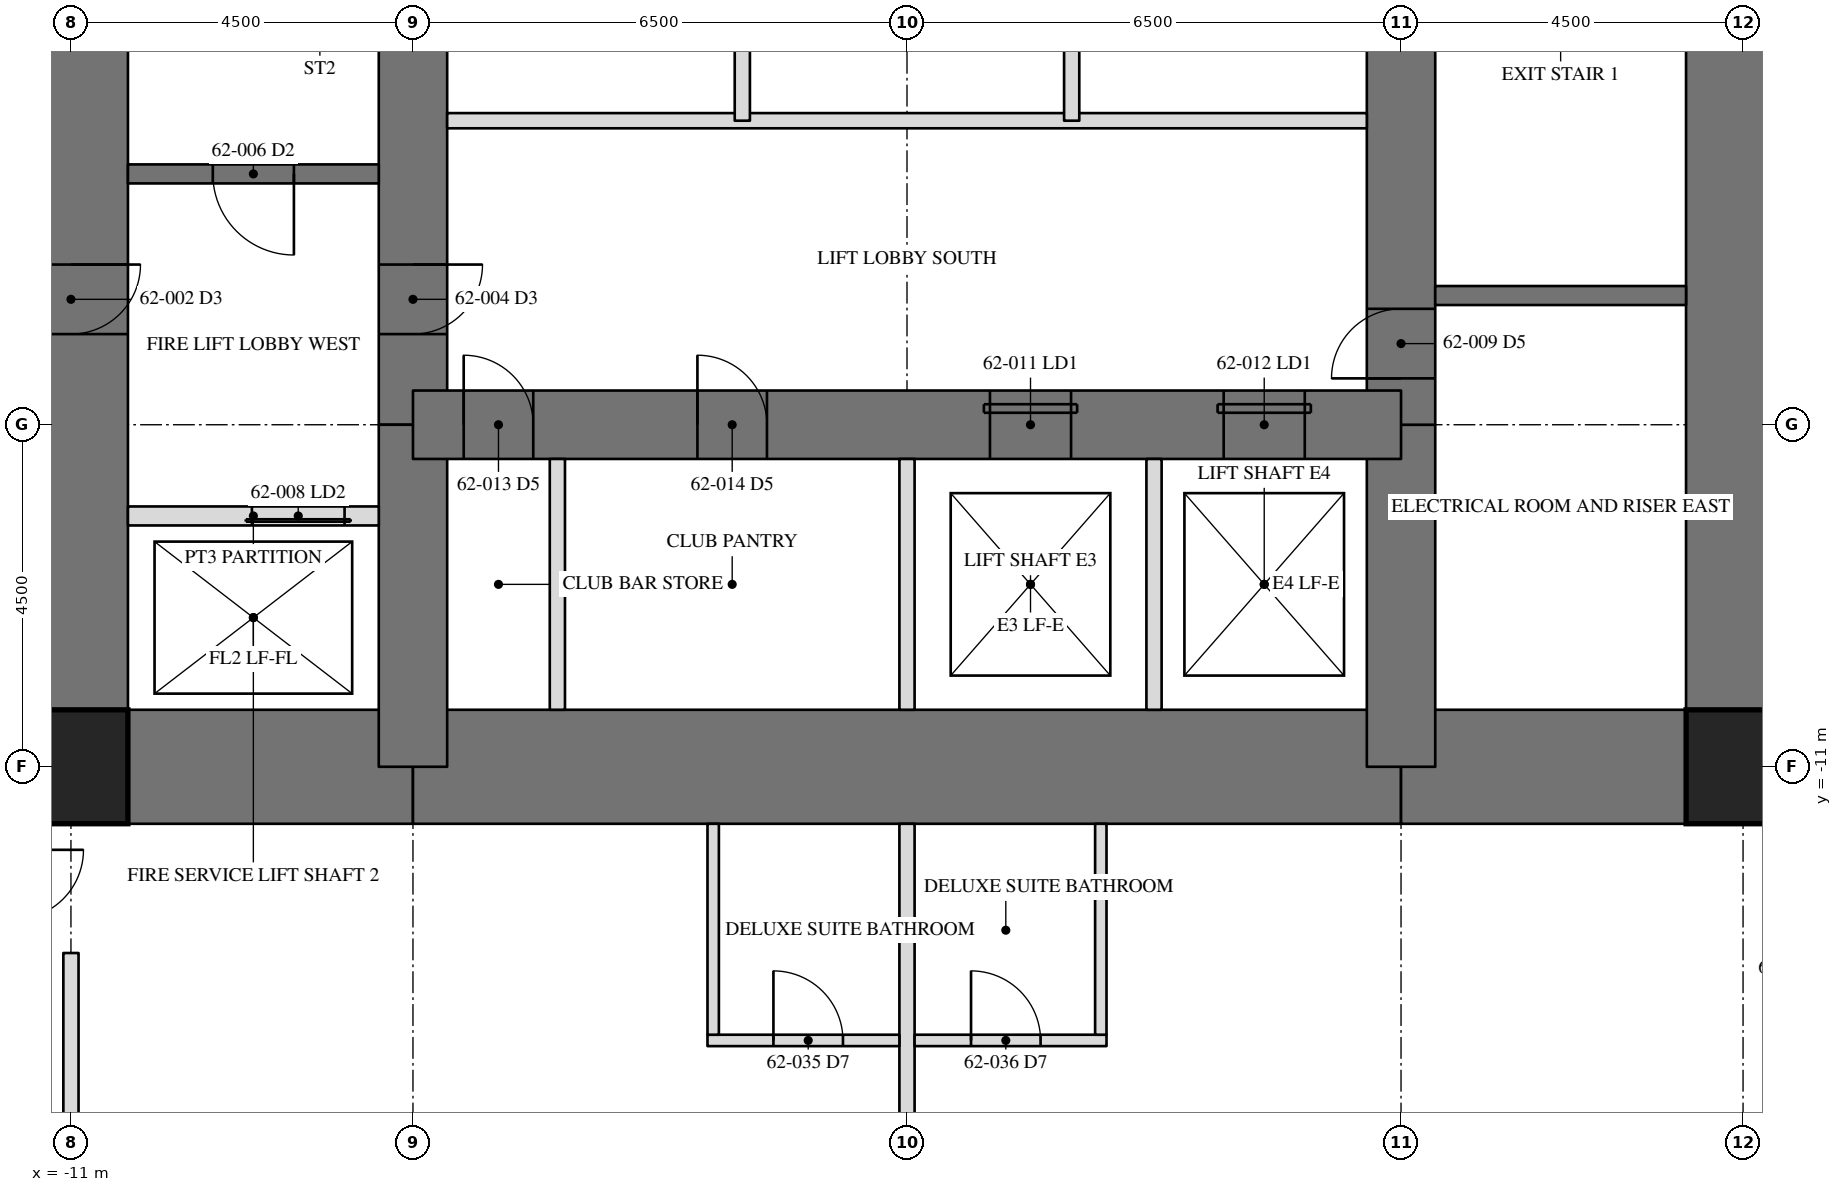
"""IFC4 building model, lengths in metres.
Left out: names, types, materials, properties, quantities, classifications, styles, units other than length and angle.
Written with IfcOpenShell. Run it as: python <this file> out.ifc"""

import sys

from ifc_helpers import new_model, si_unit, direction, frame, frame_2d, origin, origin_2d, place, context, subcontext, project, spatial, rectangle, hollow_rectangle, extrude, element, fill, save


model = new_model("IFC4")
c1 = context("Model", 3, precision=1e-05, world=origin(), true_north=direction((0.0, 1.0)))
c2 = subcontext(c1, "Body", "Model", "MODEL_VIEW")
j1 = project(units=[si_unit("LENGTHUNIT", "METRE"), si_unit("PLANEANGLEUNIT", "RADIAN")], contexts=[c1])
p1 = place(None, origin())
s1 = spatial("IfcSite", under=j1, at=p1, CompositionType="ELEMENT")
p2 = place(p1, origin())
s2 = spatial("IfcBuilding", under=s1, at=p2, CompositionType="ELEMENT")
p3 = place(p2, frame((0.0, 0.0, 253.7)))
s3 = spatial("IfcBuildingStorey", under=s2, at=p3, CompositionType="ELEMENT", Elevation=253.7)
p4 = place(p3, frame((11.0, -11.0, 0.0), z_axis=(0.0, 0.0, 1.0), x_axis=(0.0, 1.0, 0.0)))
e1 = element("IfcWall", 1, at=p4, inside=s3, PredefinedType="SHEAR", context=c2, shape_type="SweptSolid", body=[
    extrude(rectangle(XDim=22.0, YDim=1.5, at=frame_2d((11.0, 0.0))), origin(), (0.0, 0.0, 1.0), 3.5),
])
p5 = place(p4, frame((15.393, 0.0, 0.0)))
e2 = element("IfcOpeningElement", 2, at=p5, cuts=e1, PredefinedType="OPENING", context=c2, shape_type="SweptSolid", body=[
    extrude(rectangle(XDim=0.915, YDim=2.134, at=frame_2d((0.458, 1.067))), frame((0.0, 0.76, 0.0), z_axis=(0.0, -1.0, 0.0), x_axis=(1.0, 0.0, 0.0)), (0.0, 0.0, 1.0), 1.52),
])
p6 = place(p3, frame((-11.0, 11.0, 0.0), z_axis=(0.0, 0.0, 1.0), x_axis=(0.0, -1.0, 0.0)))
e3 = element("IfcWall", 3, at=p6, inside=s3, PredefinedType="SHEAR", context=c2, shape_type="SweptSolid", body=[
    extrude(rectangle(XDim=22.0, YDim=1.5, at=frame_2d((11.0, 0.0))), origin(), (0.0, 0.0, 1.0), 3.5),
])
p7 = place(p6, frame((15.393, 0.0, 0.0)))
e4 = element("IfcOpeningElement", 4, at=p7, cuts=e3, PredefinedType="OPENING", context=c2, shape_type="SweptSolid", body=[
    extrude(rectangle(XDim=0.915, YDim=2.134, at=frame_2d((0.458, 1.067))), frame((0.0, 0.76, 0.0), z_axis=(0.0, -1.0, 0.0), x_axis=(1.0, 0.0, 0.0)), (0.0, 0.0, 1.0), 1.52),
])
p8 = place(p3, frame((-11.0, -11.0, 0.0), z_axis=(0.0, 0.0, 1.0), x_axis=(1.0, 0.0, 0.0)))
e5 = element("IfcWall", 5, at=p8, inside=s3, PredefinedType="SHEAR", context=c2, shape_type="SweptSolid", body=[
    extrude(rectangle(XDim=4.5, YDim=1.5, at=frame_2d((2.25, 0.0))), origin(), (0.0, 0.0, 1.0), 3.5),
])
p9 = place(p3, frame((-6.5, -11.0, 0.0), z_axis=(0.0, 0.0, 1.0), x_axis=(1.0, 0.0, 0.0)))
e6 = element("IfcWall", 6, at=p9, inside=s3, PredefinedType="SHEAR", context=c2, shape_type="SweptSolid", body=[
    extrude(rectangle(XDim=13.0, YDim=1.5, at=frame_2d((6.5, 0.0))), origin(), (0.0, 0.0, 1.0), 3.5),
])
p10 = place(p3, frame((6.5, -11.0, 0.0), z_axis=(0.0, 0.0, 1.0), x_axis=(1.0, 0.0, 0.0)))
e7 = element("IfcWall", 7, at=p10, inside=s3, PredefinedType="SHEAR", context=c2, shape_type="SweptSolid", body=[
    extrude(rectangle(XDim=4.5, YDim=1.5, at=frame_2d((2.25, 0.0))), origin(), (0.0, 0.0, 1.0), 3.5),
])
p11 = place(p3, frame((6.5, -11.0, 0.0), z_axis=(0.0, 0.0, 1.0), x_axis=(0.0, 1.0, 0.0)))
e8 = element("IfcWall", 8, at=p11, inside=s3, PredefinedType="SHEAR", context=c2, shape_type="SweptSolid", body=[
    extrude(rectangle(XDim=4.5, YDim=0.9, at=frame_2d((2.25, 0.0))), origin(), (0.0, 0.0, 1.0), 3.5),
])
p12 = place(p3, frame((6.5, -6.5, 0.0), z_axis=(0.0, 0.0, 1.0), x_axis=(0.0, 1.0, 0.0)))
e9 = element("IfcWall", 9, at=p12, inside=s3, PredefinedType="SHEAR", context=c2, shape_type="SweptSolid", body=[
    extrude(rectangle(XDim=13.0, YDim=0.9, at=frame_2d((6.5, 0.0))), origin(), (0.0, 0.0, 1.0), 3.5),
])
p13 = place(p12, frame((10.893, 0.0, 0.0)))
e10 = element("IfcOpeningElement", 10, at=p13, cuts=e9, PredefinedType="OPENING", context=c2, shape_type="SweptSolid", body=[
    extrude(rectangle(XDim=0.915, YDim=2.134, at=frame_2d((0.458, 1.067))), frame((0.0, 0.46, 0.0), z_axis=(0.0, -1.0, 0.0), x_axis=(1.0, 0.0, 0.0)), (0.0, 0.0, 1.0), 0.92),
])
p14 = place(p12, frame((0.61, 0.0, 0.0)))
e11 = element("IfcOpeningElement", 11, at=p14, cuts=e9, PredefinedType="OPENING", context=c2, shape_type="SweptSolid", body=[
    extrude(rectangle(XDim=0.915, YDim=2.134, at=frame_2d((0.458, 1.067))), frame((0.0, 0.46, 0.0), z_axis=(0.0, -1.0, 0.0), x_axis=(1.0, 0.0, 0.0)), (0.0, 0.0, 1.0), 0.92),
])
p15 = place(p3, frame((-6.5, 6.5, 0.0), z_axis=(0.0, 0.0, 1.0), x_axis=(0.0, -1.0, 0.0)))
e12 = element("IfcWall", 12, at=p15, inside=s3, PredefinedType="SHEAR", context=c2, shape_type="SweptSolid", body=[
    extrude(rectangle(XDim=13.0, YDim=0.9, at=frame_2d((6.5, 0.0))), origin(), (0.0, 0.0, 1.0), 3.5),
])
p16 = place(p15, frame((10.893, 0.0, 0.0)))
e13 = element("IfcOpeningElement", 13, at=p16, cuts=e12, PredefinedType="OPENING", context=c2, shape_type="SweptSolid", body=[
    extrude(rectangle(XDim=0.915, YDim=2.134, at=frame_2d((0.458, 1.067))), frame((0.0, 0.46, 0.0), z_axis=(0.0, -1.0, 0.0), x_axis=(1.0, 0.0, 0.0)), (0.0, 0.0, 1.0), 0.92),
])
p17 = place(p15, frame((0.61, 0.0, 0.0)))
e14 = element("IfcOpeningElement", 14, at=p17, cuts=e12, PredefinedType="OPENING", context=c2, shape_type="SweptSolid", body=[
    extrude(rectangle(XDim=0.915, YDim=2.134, at=frame_2d((0.458, 1.067))), frame((0.0, 0.46, 0.0), z_axis=(0.0, -1.0, 0.0), x_axis=(1.0, 0.0, 0.0)), (0.0, 0.0, 1.0), 0.92),
])
p18 = place(p3, frame((-6.5, -6.5, 0.0), z_axis=(0.0, 0.0, 1.0), x_axis=(0.0, -1.0, 0.0)))
e15 = element("IfcWall", 15, at=p18, inside=s3, PredefinedType="SHEAR", context=c2, shape_type="SweptSolid", body=[
    extrude(rectangle(XDim=4.5, YDim=0.9, at=frame_2d((2.25, 0.0))), origin(), (0.0, 0.0, 1.0), 3.5),
])
p19 = place(p3, frame((-6.5, -6.5, 0.0), z_axis=(0.0, 0.0, 1.0), x_axis=(1.0, 0.0, 0.0)))
e16 = element("IfcWall", 16, at=p19, inside=s3, PredefinedType="SHEAR", context=c2, shape_type="SweptSolid", body=[
    extrude(rectangle(XDim=13.0, YDim=0.9, at=frame_2d((6.5, 0.0))), origin(), (0.0, 0.0, 1.0), 3.5),
])
p20 = place(p19, frame((7.592, 0.0, 0.0)))
e17 = element("IfcOpeningElement", 17, at=p20, cuts=e16, PredefinedType="OPENING", context=c2, shape_type="SweptSolid", body=[
    extrude(rectangle(XDim=1.067, YDim=2.134, at=frame_2d((0.533, 1.067))), frame((0.0, 0.46, 0.0), z_axis=(0.0, -1.0, 0.0), x_axis=(1.0, 0.0, 0.0)), (0.0, 0.0, 1.0), 0.92),
])
p21 = place(p19, frame((10.667, 0.0, 0.0)))
e18 = element("IfcOpeningElement", 18, at=p21, cuts=e16, PredefinedType="OPENING", context=c2, shape_type="SweptSolid", body=[
    extrude(rectangle(XDim=1.067, YDim=2.134, at=frame_2d((0.533, 1.067))), frame((0.0, 0.46, 0.0), z_axis=(0.0, -1.0, 0.0), x_axis=(1.0, 0.0, 0.0)), (0.0, 0.0, 1.0), 0.92),
])
p22 = place(p19, frame((0.667, 0.0, 0.0)))
e19 = element("IfcOpeningElement", 19, at=p22, cuts=e16, PredefinedType="OPENING", context=c2, shape_type="SweptSolid", body=[
    extrude(rectangle(XDim=0.915, YDim=2.134, at=frame_2d((0.458, 1.067))), frame((0.0, 0.46, 0.0), z_axis=(0.0, -1.0, 0.0), x_axis=(1.0, 0.0, 0.0)), (0.0, 0.0, 1.0), 0.92),
])
p23 = place(p19, frame((3.742, 0.0, 0.0)))
e20 = element("IfcOpeningElement", 20, at=p23, cuts=e16, PredefinedType="OPENING", context=c2, shape_type="SweptSolid", body=[
    extrude(rectangle(XDim=0.915, YDim=2.134, at=frame_2d((0.458, 1.067))), frame((0.0, 0.46, 0.0), z_axis=(0.0, -1.0, 0.0), x_axis=(1.0, 0.0, 0.0)), (0.0, 0.0, 1.0), 0.92),
])
for number, where, z_axis, x_axis in (
    (21, (-11.0, -11.0, 0.0), (0.0, 0.0, 1.0), (1.0, 0.0, 0.0)),
    (22, (11.0, -11.0, 0.0), (0.0, 0.0, 1.0), (1.0, 0.0, 0.0)),
):
    element("IfcColumn", number, at=place(p3, frame(where, z_axis=z_axis, x_axis=x_axis)), inside=s3, PredefinedType="COLUMN", context=c2, shape_type="SweptSolid", body=[
        extrude(hollow_rectangle(XDim=1.499, YDim=1.499, WallThickness=0.102, at=origin_2d()), origin(), (0.0, 0.0, 1.0), 3.5),
    ])
p24 = place(p3, frame((6.95, -4.8, 0.0), z_axis=(0.0, 0.0, 1.0), x_axis=(1.0, 0.0, 0.0)))
e23 = element("IfcWall", 23, at=p24, inside=s3, PredefinedType="SOLIDWALL", context=c2, shape_type="SweptSolid", body=[
    extrude(rectangle(XDim=3.3, YDim=0.25, at=frame_2d((1.65, 0.0))), origin(), (0.0, 0.0, 1.0), 3.31),
])
p25 = place(p3, frame((-6.95, -3.2, 0.0), z_axis=(0.0, 0.0, 1.0), x_axis=(-1.0, 0.0, 0.0)))
e24 = element("IfcWall", 24, at=p25, inside=s3, PredefinedType="SOLIDWALL", context=c2, shape_type="SweptSolid", body=[
    extrude(rectangle(XDim=3.3, YDim=0.25, at=frame_2d((1.65, 0.0))), origin(), (0.0, 0.0, 1.0), 3.31),
])
p26 = place(p25, frame((1.116, 0.0, 0.0)))
e25 = element("IfcOpeningElement", 25, at=p26, cuts=e24, PredefinedType="OPENING", context=c2, shape_type="SweptSolid", body=[
    extrude(rectangle(XDim=1.067, YDim=2.134, at=frame_2d((0.533, 1.067))), frame((0.0, 0.135, 0.0), z_axis=(0.0, -1.0, 0.0), x_axis=(1.0, 0.0, 0.0)), (0.0, 0.0, 1.0), 0.27),
])
p27 = place(p3, frame((-6.95, -7.7, 0.0), z_axis=(0.0, 0.0, 1.0), x_axis=(-1.0, 0.0, 0.0)))
e26 = element("IfcWall", 26, at=p27, inside=s3, PredefinedType="PARTITIONING", context=c2, shape_type="SweptSolid", body=[
    extrude(rectangle(XDim=3.3, YDim=0.25, at=frame_2d((1.65, 0.0))), origin(), (0.0, 0.0, 1.0), 3.31),
])
p28 = place(p27, frame((0.45, 0.0, 0.0)))
e27 = element("IfcOpeningElement", 27, at=p28, cuts=e26, PredefinedType="OPENING", context=c2, shape_type="SweptSolid", body=[
    extrude(rectangle(XDim=1.219, YDim=2.134, at=frame_2d((0.609, 1.067))), frame((0.0, 0.135, 0.0), z_axis=(0.0, -1.0, 0.0), x_axis=(1.0, 0.0, 0.0)), (0.0, 0.0, 1.0), 0.27),
])
p29 = place(p3, frame((6.05, -2.5, 0.0), z_axis=(0.0, 0.0, 1.0), x_axis=(-1.0, 0.0, 0.0)))
e28 = element("IfcWall", 28, at=p29, inside=s3, PredefinedType="PARTITIONING", context=c2, shape_type="SweptSolid", body=[
    extrude(rectangle(XDim=12.1, YDim=0.2, at=frame_2d((6.05, 0.0))), origin(), (0.0, 0.0, 1.0), 3.31),
])
for number, where, z_axis, x_axis in (
    (29, (0.0, -10.25, 0.0), (0.0, 0.0, 1.0), (0.0, 1.0, 0.0)),
    (30, (3.25, -10.25, 0.0), (0.0, 0.0, 1.0), (0.0, 1.0, 0.0)),
):
    element("IfcWall", number, at=place(p3, frame(where, z_axis=z_axis, x_axis=x_axis)), inside=s3, PredefinedType="PARTITIONING", context=c2, shape_type="SweptSolid", body=[
        extrude(rectangle(XDim=3.3, YDim=0.2, at=frame_2d((1.65, 0.0))), origin(), (0.0, 0.0, 1.0), 3.31),
    ])
for number, where, z_axis, x_axis in (
    (31, (-2.167, -2.5, 0.0), (0.0, 0.0, 1.0), (0.0, 1.0, 0.0)),
    (32, (2.167, -2.5, 0.0), (0.0, 0.0, 1.0), (0.0, 1.0, 0.0)),
):
    element("IfcWall", number, at=place(p3, frame(where, z_axis=z_axis, x_axis=x_axis)), inside=s3, PredefinedType="PARTITIONING", context=c2, shape_type="SweptSolid", body=[
        extrude(rectangle(XDim=5.0, YDim=0.2, at=frame_2d((2.5, 0.0))), origin(), (0.0, 0.0, 1.0), 3.31),
    ])
p30 = place(p3, frame((-4.6, -10.25, 0.0), z_axis=(0.0, 0.0, 1.0), x_axis=(0.0, 1.0, 0.0)))
e33 = element("IfcWall", 33, at=p30, inside=s3, PredefinedType="PARTITIONING", context=c2, shape_type="SweptSolid", body=[
    extrude(rectangle(XDim=3.3, YDim=0.2, at=frame_2d((1.65, 0.0))), origin(), (0.0, 0.0, 1.0), 3.31),
])
p31 = place(p3, frame((-11.0, -13.45, 0.0), z_axis=(0.0, 0.0, 1.0), x_axis=(0.0, -1.0, 0.0)))
e34 = element("IfcWall", 34, at=p31, inside=s3, PredefinedType="PARTITIONING", context=c2, shape_type="SweptSolid", body=[
    extrude(rectangle(XDim=6.465, YDim=0.2, at=frame_2d((3.232, 0.0))), origin(), (0.0, 0.0, 1.0), 2.383),
])
p32 = place(p3, frame((0.0, -11.75, 0.0), z_axis=(0.0, 0.0, 1.0), x_axis=(0.0, -1.0, 0.0)))
e35 = element("IfcWall", 35, at=p32, inside=s3, PredefinedType="PARTITIONING", context=c2, shape_type="SweptSolid", body=[
    extrude(rectangle(XDim=8.165, YDim=0.2, at=frame_2d((4.083, 0.0))), origin(), (0.0, 0.0, 1.0), 2.383),
])
p33 = place(p3, frame((-2.625, -14.6, 0.0), z_axis=(0.0, 0.0, 1.0), x_axis=(1.0, 0.0, 0.0)))
e36 = element("IfcWall", 36, at=p33, inside=s3, PredefinedType="PARTITIONING", context=c2, shape_type="SweptSolid", body=[
    extrude(rectangle(XDim=2.525, YDim=0.15, at=frame_2d((1.262, 0.0))), origin(), (0.0, 0.0, 1.0), 3.31),
])
p34 = place(p33, frame((0.867, 0.0, 0.0)))
e37 = element("IfcOpeningElement", 37, at=p34, cuts=e36, PredefinedType="OPENING", context=c2, shape_type="SweptSolid", body=[
    extrude(rectangle(XDim=0.915, YDim=2.032, at=frame_2d((0.458, 1.016))), frame((0.0, 0.085, 0.0), z_axis=(0.0, -1.0, 0.0), x_axis=(1.0, 0.0, 0.0)), (0.0, 0.0, 1.0), 0.17),
])
p35 = place(p3, frame((-2.55, -11.75, 0.0), z_axis=(0.0, 0.0, 1.0), x_axis=(0.0, -1.0, 0.0)))
e38 = element("IfcWall", 38, at=p35, inside=s3, PredefinedType="PARTITIONING", context=c2, shape_type="SweptSolid", body=[
    extrude(rectangle(XDim=2.775, YDim=0.15, at=frame_2d((1.387, 0.0))), origin(), (0.0, 0.0, 1.0), 3.31),
])
p36 = place(p3, frame((0.1, -14.6, 0.0), z_axis=(0.0, 0.0, 1.0), x_axis=(1.0, 0.0, 0.0)))
e39 = element("IfcWall", 39, at=p36, inside=s3, PredefinedType="PARTITIONING", context=c2, shape_type="SweptSolid", body=[
    extrude(rectangle(XDim=2.525, YDim=0.15, at=frame_2d((1.262, 0.0))), origin(), (0.0, 0.0, 1.0), 3.31),
])
p37 = place(p36, frame((0.742, 0.0, 0.0)))
e40 = element("IfcOpeningElement", 40, at=p37, cuts=e39, PredefinedType="OPENING", context=c2, shape_type="SweptSolid", body=[
    extrude(rectangle(XDim=0.915, YDim=2.032, at=frame_2d((0.458, 1.016))), frame((0.0, 0.085, 0.0), z_axis=(0.0, -1.0, 0.0), x_axis=(1.0, 0.0, 0.0)), (0.0, 0.0, 1.0), 0.17),
])
p38 = place(p3, frame((2.55, -11.75, 0.0), z_axis=(0.0, 0.0, 1.0), x_axis=(0.0, -1.0, 0.0)))
e41 = element("IfcWall", 41, at=p38, inside=s3, PredefinedType="PARTITIONING", context=c2, shape_type="SweptSolid", body=[
    extrude(rectangle(XDim=2.775, YDim=0.15, at=frame_2d((1.387, 0.0))), origin(), (0.0, 0.0, 1.0), 3.31),
])
p39 = place(p16, origin())
e42 = element("IfcDoor", 42, at=p39, inside=s3, OperationType="SINGLE_SWING_RIGHT", PredefinedType="DOOR", context=c2, shape_type="SweptSolid", body=[
    extrude(rectangle(XDim=0.915, YDim=2.134, at=frame_2d((0.458, 1.067))), frame((0.0, -0.375, 0.0), z_axis=(0.0, -1.0, 0.0), x_axis=(1.0, 0.0, 0.0)), (0.0, 0.0, 1.0), 0.05),
])
fill(e13, e42)
p40 = place(p26, origin())
e43 = element("IfcDoor", 43, at=p40, inside=s3, OperationType="SINGLE_SWING_LEFT", PredefinedType="DOOR", context=c2, shape_type="SweptSolid", body=[
    extrude(rectangle(XDim=1.067, YDim=2.134, at=frame_2d((0.533, 1.067))), frame((0.0, 0.025, 0.0), z_axis=(0.0, -1.0, 0.0), x_axis=(1.0, 0.0, 0.0)), (0.0, 0.0, 1.0), 0.05),
])
fill(e25, e43)
p41 = place(p28, origin())
e44 = element("IfcDoor", 44, at=p41, inside=s3, OperationType="SLIDING_TO_LEFT", PredefinedType="DOOR", context=c2, shape_type="SweptSolid", body=[
    extrude(rectangle(XDim=1.219, YDim=2.134, at=frame_2d((0.609, 1.067))), frame((0.0, 0.025, 0.0), z_axis=(0.0, -1.0, 0.0), x_axis=(1.0, 0.0, 0.0)), (0.0, 0.0, 1.0), 0.05),
])
fill(e27, e44)
p42 = place(p14, origin())
e45 = element("IfcDoor", 45, at=p42, inside=s3, OperationType="SINGLE_SWING_RIGHT", PredefinedType="DOOR", context=c2, shape_type="SweptSolid", body=[
    extrude(rectangle(XDim=0.915, YDim=2.134, at=frame_2d((0.458, 1.067))), frame((0.0, -0.375, 0.0), z_axis=(0.0, -1.0, 0.0), x_axis=(1.0, 0.0, 0.0)), (0.0, 0.0, 1.0), 0.05),
])
fill(e11, e45)
p43 = place(p20, origin())
e46 = element("IfcDoor", 46, at=p43, inside=s3, OperationType="SLIDING_TO_LEFT", PredefinedType="DOOR", context=c2, shape_type="SweptSolid", body=[
    extrude(rectangle(XDim=1.067, YDim=2.134, at=frame_2d((0.533, 1.067))), frame((0.0, -0.375, 0.0), z_axis=(0.0, -1.0, 0.0), x_axis=(1.0, 0.0, 0.0)), (0.0, 0.0, 1.0), 0.05),
])
fill(e17, e46)
p44 = place(p21, origin())
e47 = element("IfcDoor", 47, at=p44, inside=s3, OperationType="SLIDING_TO_LEFT", PredefinedType="DOOR", context=c2, shape_type="SweptSolid", body=[
    extrude(rectangle(XDim=1.067, YDim=2.134, at=frame_2d((0.533, 1.067))), frame((0.0, -0.375, 0.0), z_axis=(0.0, -1.0, 0.0), x_axis=(1.0, 0.0, 0.0)), (0.0, 0.0, 1.0), 0.05),
])
fill(e18, e47)
p45 = place(p22, origin())
e48 = element("IfcDoor", 48, at=p45, inside=s3, OperationType="SINGLE_SWING_RIGHT", PredefinedType="DOOR", context=c2, shape_type="SweptSolid", body=[
    extrude(rectangle(XDim=0.915, YDim=2.134, at=frame_2d((0.458, 1.067))), frame((0.0, -0.375, 0.0), z_axis=(0.0, -1.0, 0.0), x_axis=(1.0, 0.0, 0.0)), (0.0, 0.0, 1.0), 0.05),
])
fill(e19, e48)
p46 = place(p23, origin())
e49 = element("IfcDoor", 49, at=p46, inside=s3, OperationType="SINGLE_SWING_RIGHT", PredefinedType="DOOR", context=c2, shape_type="SweptSolid", body=[
    extrude(rectangle(XDim=0.915, YDim=2.134, at=frame_2d((0.458, 1.067))), frame((0.0, -0.375, 0.0), z_axis=(0.0, -1.0, 0.0), x_axis=(1.0, 0.0, 0.0)), (0.0, 0.0, 1.0), 0.05),
])
fill(e20, e49)
p47 = place(p34, origin())
e50 = element("IfcDoor", 50, at=p47, inside=s3, OperationType="SINGLE_SWING_LEFT", PredefinedType="DOOR", context=c2, shape_type="SweptSolid", body=[
    extrude(rectangle(XDim=0.915, YDim=2.032, at=frame_2d((0.458, 1.016))), frame((0.0, 0.025, 0.0), z_axis=(0.0, -1.0, 0.0), x_axis=(1.0, 0.0, 0.0)), (0.0, 0.0, 1.0), 0.05),
])
fill(e37, e50)
p48 = place(p37, origin())
e51 = element("IfcDoor", 51, at=p48, inside=s3, OperationType="SINGLE_SWING_LEFT", PredefinedType="DOOR", context=c2, shape_type="SweptSolid", body=[
    extrude(rectangle(XDim=0.915, YDim=2.032, at=frame_2d((0.458, 1.016))), frame((0.0, 0.025, 0.0), z_axis=(0.0, -1.0, 0.0), x_axis=(1.0, 0.0, 0.0)), (0.0, 0.0, 1.0), 0.05),
])
fill(e40, e51)
save(model, sys.argv[1])
